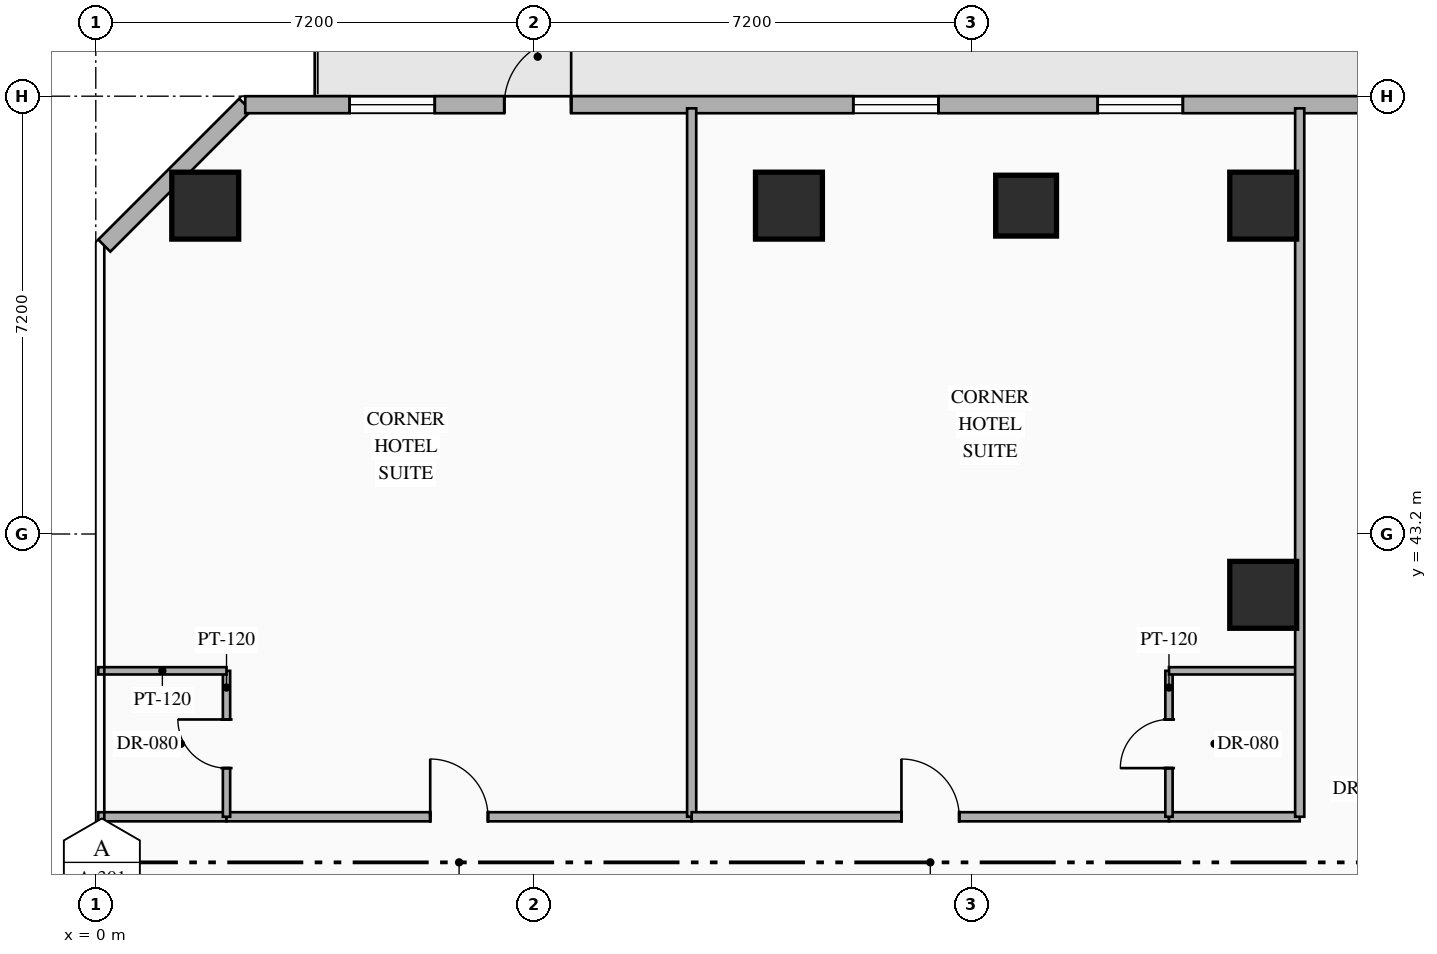
"""IFC4 building model, lengths in metres.
Left out: names, types, materials, properties, quantities, classifications, styles, units other than length and angle.
Written with IfcOpenShell. Run it as: python <this file> out.ifc"""

import sys

from ifc_helpers import new_model, si_unit, direction, frame, frame_2d, origin, origin_2d, place, context, subcontext, project, spatial, rectangle, hollow_rectangle, extrude, element, fill, save


model = new_model("IFC4")
c1 = context("Model", 3, precision=1e-05, world=origin(), true_north=direction((0.0, 1.0)))
c2 = subcontext(c1, "Body", "Model", "MODEL_VIEW")
j1 = project(units=[si_unit("LENGTHUNIT", "METRE"), si_unit("PLANEANGLEUNIT", "RADIAN")], contexts=[c1])
p1 = place(None, origin())
s1 = spatial("IfcSite", under=j1, at=p1, CompositionType="ELEMENT")
p2 = place(p1, origin())
s2 = spatial("IfcBuilding", under=s1, at=p2, CompositionType="ELEMENT")
p3 = place(p2, frame((0.0, 0.0, 53.35)))
s3 = spatial("IfcBuildingStorey", under=s2, at=p3, CompositionType="ELEMENT", Elevation=53.35)
for number, where, z_axis, x_axis in (
    (1, (1.8, 48.6, 0.0), (0.0, 0.0, 1.0), (1.0, 0.0, 0.0)),
    (2, (11.4, 48.6, 0.0), (0.0, 0.0, 1.0), (1.0, 0.0, 0.0)),
    (3, (19.2, 48.6, 0.0), (0.0, 0.0, 1.0), (1.0, 0.0, 0.0)),
    (4, (19.2, 42.2, 0.0), (0.0, 0.0, 1.0), (1.0, 0.0, 0.0)),
):
    element("IfcColumn", number, at=place(p3, frame(where, z_axis=z_axis, x_axis=x_axis)), inside=s3, PredefinedType="COLUMN", context=c2, shape_type="SweptSolid", body=[
        extrude(hollow_rectangle(XDim=1.1, YDim=1.1, WallThickness=0.04, at=origin_2d()), origin(), (0.0, 0.0, 1.0), 3.35),
    ])
p4 = place(p3, frame((15.3, 48.6, 0.0), z_axis=(0.0, 0.0, 1.0), x_axis=(1.0, 0.0, 0.0)))
e5 = element("IfcColumn", 5, at=p4, inside=s3, PredefinedType="COLUMN", context=c2, shape_type="SweptSolid", body=[
    extrude(hollow_rectangle(XDim=1.0, YDim=1.0, WallThickness=0.038, at=origin_2d()), origin(), (0.0, 0.0, 1.0), 3.35),
])
p5 = place(p3, frame((0.14, 47.942, 0.0), z_axis=(0.0, 0.0, 1.0), x_axis=(0.707106781187, 0.707106781187, 0.0)))
e6 = element("IfcWall", 6, at=p5, inside=s3, PredefinedType="STANDARD", context=c2, shape_type="SweptSolid", body=[
    extrude(rectangle(XDim=3.278, YDim=0.28, at=frame_2d((1.639, 0.0))), origin(), (0.0, 0.0, 1.0), 3.13),
])
p6 = place(p3, frame((2.458, 50.26, 0.0), z_axis=(0.0, 0.0, 1.0), x_axis=(1.0, 0.0, 0.0)))
e7 = element("IfcWall", 7, at=p6, inside=s3, PredefinedType="STANDARD", context=c2, shape_type="SweptSolid", body=[
    extrude(rectangle(XDim=40.084, YDim=0.28, at=frame_2d((20.042, 0.0))), origin(), (0.0, 0.0, 1.0), 3.13),
])
p7 = place(p6, frame((4.26, 0.0, 0.0)))
e8 = element("IfcOpeningElement", 8, at=p7, cuts=e7, PredefinedType="OPENING", context=c2, shape_type="SweptSolid", body=[
    extrude(rectangle(XDim=1.1, YDim=2.2, at=frame_2d((0.55, 1.1))), frame((0.0, 0.15, 0.0), z_axis=(0.0, -1.0, 0.0), x_axis=(1.0, 0.0, 0.0)), (0.0, 0.0, 1.0), 0.3),
])
p8 = place(p6, frame((1.717, 0.0, 0.85)))
e9 = element("IfcOpeningElement", 9, at=p8, cuts=e7, PredefinedType="OPENING", context=c2, shape_type="SweptSolid", body=[
    extrude(rectangle(XDim=1.4, YDim=1.8, at=frame_2d((0.7, 0.9))), frame((0.0, 0.15, 0.0), z_axis=(0.0, -1.0, 0.0), x_axis=(1.0, 0.0, 0.0)), (0.0, 0.0, 1.0), 0.3),
])
p9 = place(p6, frame((10.0, 0.0, 0.85)))
e10 = element("IfcOpeningElement", 10, at=p9, cuts=e7, PredefinedType="OPENING", context=c2, shape_type="SweptSolid", body=[
    extrude(rectangle(XDim=1.4, YDim=1.8, at=frame_2d((0.7, 0.9))), frame((0.0, 0.15, 0.0), z_axis=(0.0, -1.0, 0.0), x_axis=(1.0, 0.0, 0.0)), (0.0, 0.0, 1.0), 0.3),
])
p10 = place(p6, frame((14.02, 0.0, 0.85)))
e11 = element("IfcOpeningElement", 11, at=p10, cuts=e7, PredefinedType="OPENING", context=c2, shape_type="SweptSolid", body=[
    extrude(rectangle(XDim=1.4, YDim=1.8, at=frame_2d((0.7, 0.9))), frame((0.0, 0.15, 0.0), z_axis=(0.0, -1.0, 0.0), x_axis=(1.0, 0.0, 0.0)), (0.0, 0.0, 1.0), 0.3),
])
p11 = place(p6, frame((20.789, 0.0, 0.85)))
e12 = element("IfcOpeningElement", 12, at=p11, cuts=e7, PredefinedType="OPENING", context=c2, shape_type="SweptSolid", body=[
    extrude(rectangle(XDim=1.4, YDim=1.8, at=frame_2d((0.7, 0.9))), frame((0.0, 0.15, 0.0), z_axis=(0.0, -1.0, 0.0), x_axis=(1.0, 0.0, 0.0)), (0.0, 0.0, 1.0), 0.3),
])
p12 = place(p6, frame((24.664, 0.0, 0.85)))
e13 = element("IfcOpeningElement", 13, at=p12, cuts=e7, PredefinedType="OPENING", context=c2, shape_type="SweptSolid", body=[
    extrude(rectangle(XDim=1.4, YDim=1.8, at=frame_2d((0.7, 0.9))), frame((0.0, 0.15, 0.0), z_axis=(0.0, -1.0, 0.0), x_axis=(1.0, 0.0, 0.0)), (0.0, 0.0, 1.0), 0.3),
])
p13 = place(p6, frame((26.803, 0.0, 0.85)))
e14 = element("IfcOpeningElement", 14, at=p13, cuts=e7, PredefinedType="OPENING", context=c2, shape_type="SweptSolid", body=[
    extrude(rectangle(XDim=1.4, YDim=1.8, at=frame_2d((0.7, 0.9))), frame((0.0, 0.15, 0.0), z_axis=(0.0, -1.0, 0.0), x_axis=(1.0, 0.0, 0.0)), (0.0, 0.0, 1.0), 0.3),
])
p14 = place(p6, frame((32.703, 0.0, 0.85)))
e15 = element("IfcOpeningElement", 15, at=p14, cuts=e7, PredefinedType="OPENING", context=c2, shape_type="SweptSolid", body=[
    extrude(rectangle(XDim=1.4, YDim=1.8, at=frame_2d((0.7, 0.9))), frame((0.0, 0.15, 0.0), z_axis=(0.0, -1.0, 0.0), x_axis=(1.0, 0.0, 0.0)), (0.0, 0.0, 1.0), 0.3),
])
p15 = place(p6, frame((36.967, 0.0, 0.85)))
e16 = element("IfcOpeningElement", 16, at=p15, cuts=e7, PredefinedType="OPENING", context=c2, shape_type="SweptSolid", body=[
    extrude(rectangle(XDim=1.4, YDim=1.8, at=frame_2d((0.7, 0.9))), frame((0.0, 0.15, 0.0), z_axis=(0.0, -1.0, 0.0), x_axis=(1.0, 0.0, 0.0)), (0.0, 0.0, 1.0), 0.3),
])
p16 = place(p3, frame((0.04, 38.55, 0.0), z_axis=(0.0, 0.0, 1.0), x_axis=(1.0, 0.0, 0.0)))
e17 = element("IfcWall", 17, at=p16, inside=s3, PredefinedType="PARTITIONING", context=c2, shape_type="SweptSolid", body=[
    extrude(rectangle(XDim=2.11, YDim=0.15, at=frame_2d((1.055, 0.0))), origin(), (0.0, 0.0, 1.0), 2.775),
])
p17 = place(p3, frame((2.15, 38.55, 0.0), z_axis=(0.0, 0.0, 1.0), x_axis=(1.0, 0.0, 0.0)))
e18 = element("IfcWall", 18, at=p17, inside=s3, PredefinedType="PARTITIONING", context=c2, shape_type="SweptSolid", body=[
    extrude(rectangle(XDim=7.65, YDim=0.15, at=frame_2d((3.825, 0.0))), origin(), (0.0, 0.0, 1.0), 2.775),
])
p18 = place(p17, frame((3.35, 0.0, 0.0)))
e19 = element("IfcOpeningElement", 19, at=p18, cuts=e18, PredefinedType="OPENING", context=c2, shape_type="SweptSolid", body=[
    extrude(rectangle(XDim=0.95, YDim=2.15, at=frame_2d((0.475, 1.075))), frame((0.0, 0.085, 0.0), z_axis=(0.0, -1.0, 0.0), x_axis=(1.0, 0.0, 0.0)), (0.0, 0.0, 1.0), 0.17),
])
p19 = place(p3, frame((2.15, 38.55, 0.0), z_axis=(0.0, 0.0, 1.0), x_axis=(0.0, 1.0, 0.0)))
e20 = element("IfcWall", 20, at=p19, inside=s3, PredefinedType="PARTITIONING", context=c2, shape_type="SweptSolid", body=[
    extrude(rectangle(XDim=2.4, YDim=0.12, at=frame_2d((1.2, 0.0))), origin(), (0.0, 0.0, 1.0), 3.13),
])
p20 = place(p19, frame((0.8, 0.0, 0.0)))
e21 = element("IfcOpeningElement", 21, at=p20, cuts=e20, PredefinedType="OPENING", context=c2, shape_type="SweptSolid", body=[
    extrude(rectangle(XDim=0.8, YDim=2.06, at=frame_2d((0.4, 1.03))), frame((0.0, 0.07, 0.0), z_axis=(0.0, -1.0, 0.0), x_axis=(1.0, 0.0, 0.0)), (0.0, 0.0, 1.0), 0.14),
])
p21 = place(p3, frame((0.04, 40.95, 0.0), z_axis=(0.0, 0.0, 1.0), x_axis=(1.0, 0.0, 0.0)))
e22 = element("IfcWall", 22, at=p21, inside=s3, PredefinedType="PARTITIONING", context=c2, shape_type="SweptSolid", body=[
    extrude(rectangle(XDim=2.11, YDim=0.12, at=frame_2d((1.055, 0.0))), origin(), (0.0, 0.0, 1.0), 2.775),
])
p22 = place(p3, frame((9.8, 38.55, 0.0), z_axis=(0.0, 0.0, 1.0), x_axis=(0.0, 1.0, 0.0)))
e23 = element("IfcWall", 23, at=p22, inside=s3, PredefinedType="PARTITIONING", context=c2, shape_type="SweptSolid", body=[
    extrude(rectangle(XDim=11.65, YDim=0.15, at=frame_2d((5.825, 0.0))), origin(), (0.0, 0.0, 1.0), 3.13),
])
p23 = place(p3, frame((9.8, 38.55, 0.0), z_axis=(0.0, 0.0, 1.0), x_axis=(1.0, 0.0, 0.0)))
e24 = element("IfcWall", 24, at=p23, inside=s3, PredefinedType="PARTITIONING", context=c2, shape_type="SweptSolid", body=[
    extrude(rectangle(XDim=7.85, YDim=0.15, at=frame_2d((3.925, 0.0))), origin(), (0.0, 0.0, 1.0), 2.775),
])
p24 = place(p23, frame((3.45, 0.0, 0.0)))
e25 = element("IfcOpeningElement", 25, at=p24, cuts=e24, PredefinedType="OPENING", context=c2, shape_type="SweptSolid", body=[
    extrude(rectangle(XDim=0.95, YDim=2.15, at=frame_2d((0.475, 1.075))), frame((0.0, 0.085, 0.0), z_axis=(0.0, -1.0, 0.0), x_axis=(1.0, 0.0, 0.0)), (0.0, 0.0, 1.0), 0.17),
])
p25 = place(p3, frame((17.65, 38.55, 0.0), z_axis=(0.0, 0.0, 1.0), x_axis=(1.0, 0.0, 0.0)))
e26 = element("IfcWall", 26, at=p25, inside=s3, PredefinedType="PARTITIONING", context=c2, shape_type="SweptSolid", body=[
    extrude(rectangle(XDim=2.15, YDim=0.15, at=frame_2d((1.075, 0.0))), origin(), (0.0, 0.0, 1.0), 2.775),
])
p26 = place(p3, frame((17.65, 38.55, 0.0), z_axis=(0.0, 0.0, 1.0), x_axis=(0.0, 1.0, 0.0)))
e27 = element("IfcWall", 27, at=p26, inside=s3, PredefinedType="PARTITIONING", context=c2, shape_type="SweptSolid", body=[
    extrude(rectangle(XDim=2.4, YDim=0.12, at=frame_2d((1.2, 0.0))), origin(), (0.0, 0.0, 1.0), 3.13),
])
p27 = place(p26, frame((0.8, 0.0, 0.0)))
e28 = element("IfcOpeningElement", 28, at=p27, cuts=e27, PredefinedType="OPENING", context=c2, shape_type="SweptSolid", body=[
    extrude(rectangle(XDim=0.8, YDim=2.06, at=frame_2d((0.4, 1.03))), frame((0.0, 0.07, 0.0), z_axis=(0.0, -1.0, 0.0), x_axis=(1.0, 0.0, 0.0)), (0.0, 0.0, 1.0), 0.14),
])
p28 = place(p3, frame((17.65, 40.95, 0.0), z_axis=(0.0, 0.0, 1.0), x_axis=(1.0, 0.0, 0.0)))
e29 = element("IfcWall", 29, at=p28, inside=s3, PredefinedType="PARTITIONING", context=c2, shape_type="SweptSolid", body=[
    extrude(rectangle(XDim=2.15, YDim=0.12, at=frame_2d((1.075, 0.0))), origin(), (0.0, 0.0, 1.0), 2.775),
])
p29 = place(p3, frame((19.8, 38.55, 0.0), z_axis=(0.0, 0.0, 1.0), x_axis=(0.0, 1.0, 0.0)))
e30 = element("IfcWall", 30, at=p29, inside=s3, PredefinedType="PARTITIONING", context=c2, shape_type="SweptSolid", body=[
    extrude(rectangle(XDim=11.65, YDim=0.15, at=frame_2d((5.825, 0.0))), origin(), (0.0, 0.0, 1.0), 3.13),
])
p30 = place(p7, origin())
e31 = element("IfcDoor", 31, at=p30, inside=s3, OperationType="SINGLE_SWING_RIGHT", PredefinedType="DOOR", context=c2, shape_type="SweptSolid", body=[
    extrude(rectangle(XDim=1.1, YDim=2.2, at=frame_2d((0.55, 1.1))), frame((0.0, 0.025, 0.0), z_axis=(0.0, -1.0, 0.0), x_axis=(1.0, 0.0, 0.0)), (0.0, 0.0, 1.0), 0.05),
])
fill(e8, e31)
p31 = place(p8, origin())
e32 = element("IfcWindow", 32, at=p31, inside=s3, PartitioningType="SINGLE_PANEL", PredefinedType="WINDOW", context=c2, shape_type="SweptSolid", body=[
    extrude(rectangle(XDim=1.4, YDim=1.8, at=frame_2d((0.7, 0.9))), frame((0.0, 0.03, 0.0), z_axis=(0.0, -1.0, 0.0), x_axis=(1.0, 0.0, 0.0)), (0.0, 0.0, 1.0), 0.06),
])
fill(e9, e32)
p32 = place(p9, origin())
e33 = element("IfcWindow", 33, at=p32, inside=s3, PartitioningType="SINGLE_PANEL", PredefinedType="WINDOW", context=c2, shape_type="SweptSolid", body=[
    extrude(rectangle(XDim=1.4, YDim=1.8, at=frame_2d((0.7, 0.9))), frame((0.0, 0.03, 0.0), z_axis=(0.0, -1.0, 0.0), x_axis=(1.0, 0.0, 0.0)), (0.0, 0.0, 1.0), 0.06),
])
fill(e10, e33)
p33 = place(p10, origin())
e34 = element("IfcWindow", 34, at=p33, inside=s3, PartitioningType="SINGLE_PANEL", PredefinedType="WINDOW", context=c2, shape_type="SweptSolid", body=[
    extrude(rectangle(XDim=1.4, YDim=1.8, at=frame_2d((0.7, 0.9))), frame((0.0, 0.03, 0.0), z_axis=(0.0, -1.0, 0.0), x_axis=(1.0, 0.0, 0.0)), (0.0, 0.0, 1.0), 0.06),
])
fill(e11, e34)
p34 = place(p18, origin())
e35 = element("IfcDoor", 35, at=p34, inside=s3, OperationType="SINGLE_SWING_LEFT", PredefinedType="DOOR", context=c2, shape_type="SweptSolid", body=[
    extrude(rectangle(XDim=0.95, YDim=2.15, at=frame_2d((0.475, 1.075))), frame((0.0, 0.025, 0.0), z_axis=(0.0, -1.0, 0.0), x_axis=(1.0, 0.0, 0.0)), (0.0, 0.0, 1.0), 0.05),
])
fill(e19, e35)
p35 = place(p20, origin())
e36 = element("IfcDoor", 36, at=p35, inside=s3, OperationType="SINGLE_SWING_RIGHT", PredefinedType="DOOR", context=c2, shape_type="SweptSolid", body=[
    extrude(rectangle(XDim=0.8, YDim=2.06, at=frame_2d((0.4, 1.03))), frame((0.0, 0.025, 0.0), z_axis=(0.0, -1.0, 0.0), x_axis=(1.0, 0.0, 0.0)), (0.0, 0.0, 1.0), 0.05),
])
fill(e21, e36)
p36 = place(p24, origin())
e37 = element("IfcDoor", 37, at=p36, inside=s3, OperationType="SINGLE_SWING_LEFT", PredefinedType="DOOR", context=c2, shape_type="SweptSolid", body=[
    extrude(rectangle(XDim=0.95, YDim=2.15, at=frame_2d((0.475, 1.075))), frame((0.0, 0.025, 0.0), z_axis=(0.0, -1.0, 0.0), x_axis=(1.0, 0.0, 0.0)), (0.0, 0.0, 1.0), 0.05),
])
fill(e25, e37)
p37 = place(p27, origin())
e38 = element("IfcDoor", 38, at=p37, inside=s3, OperationType="SINGLE_SWING_LEFT", PredefinedType="DOOR", context=c2, shape_type="SweptSolid", body=[
    extrude(rectangle(XDim=0.8, YDim=2.06, at=frame_2d((0.4, 1.03))), frame((0.0, 0.025, 0.0), z_axis=(0.0, -1.0, 0.0), x_axis=(1.0, 0.0, 0.0)), (0.0, 0.0, 1.0), 0.05),
])
fill(e28, e38)
save(model, sys.argv[1])
